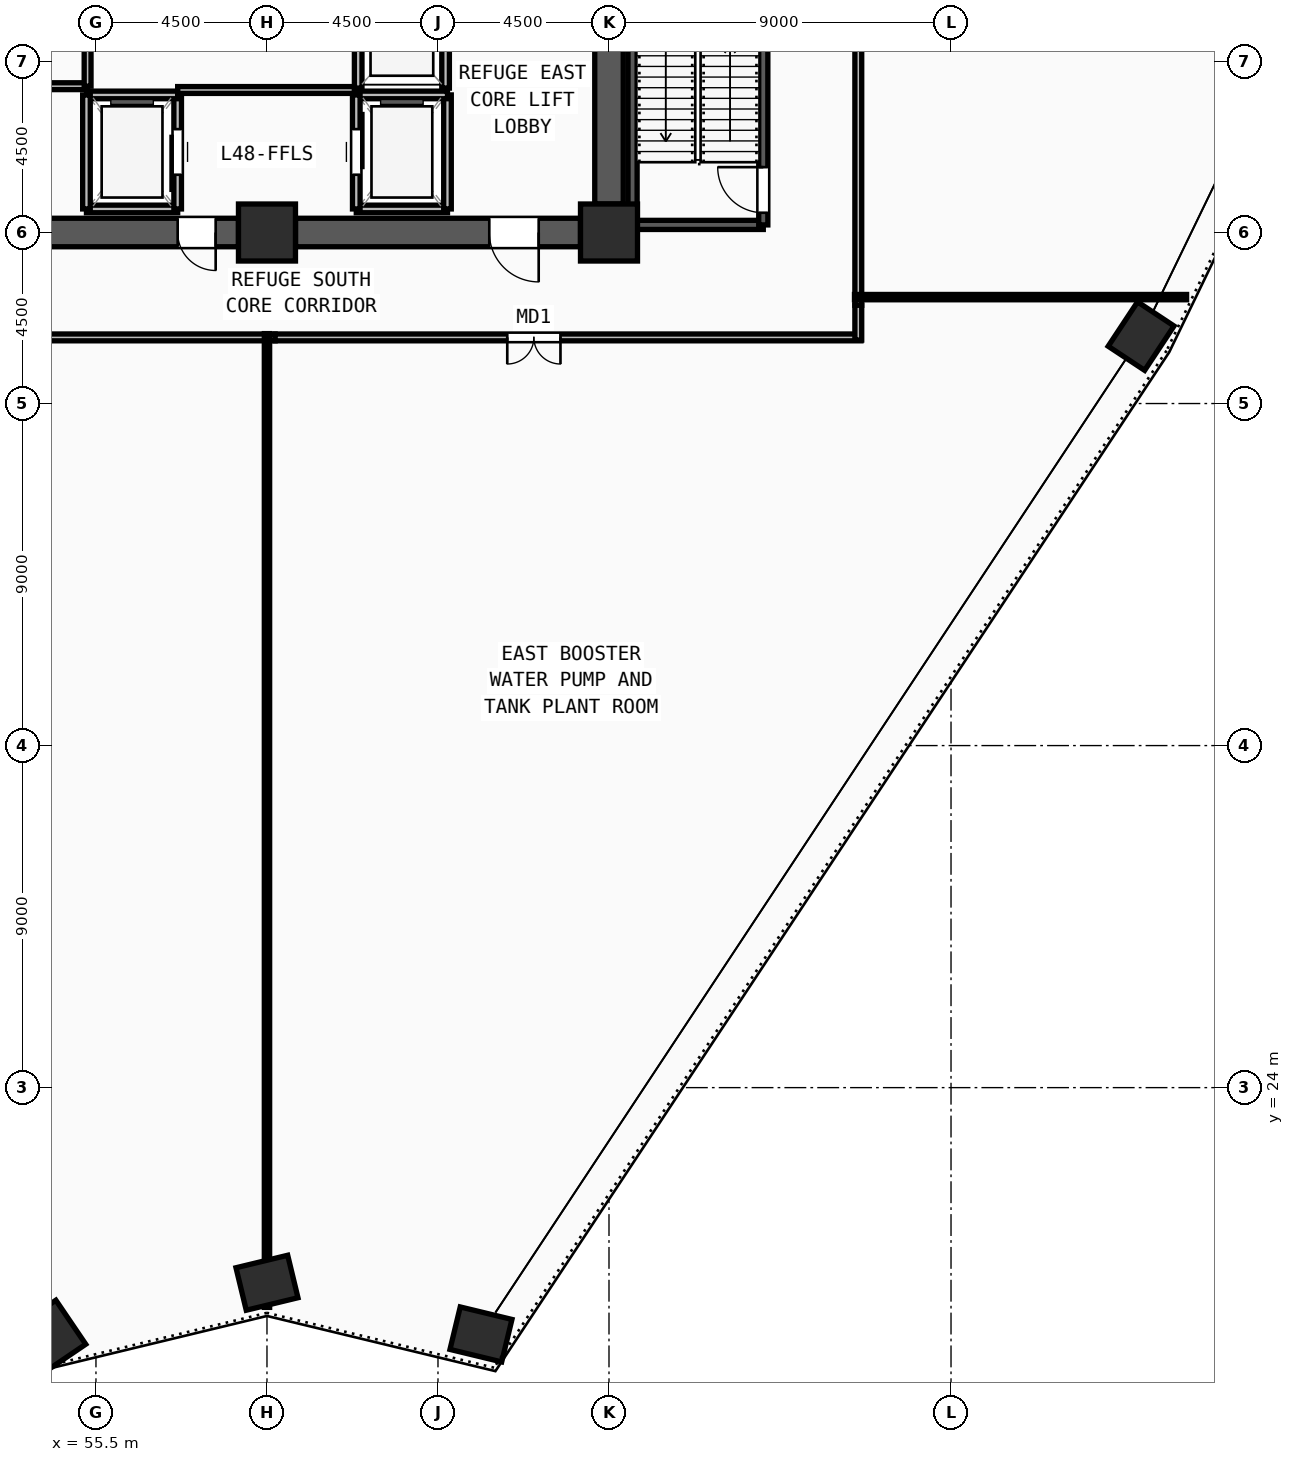
"""IFC4 building model, lengths in metres.
Left out: names, types, materials, properties, quantities, classifications, styles, units other than length and angle.
Written with IfcOpenShell. Run it as: python <this file> out.ifc"""

import sys

from ifc_helpers import new_model, si_unit, direction, frame, frame_2d, origin, origin_2d, place, context, subcontext, project, spatial, rectangle, extrude, source, transform, mapped, element, fill, save


model = new_model("IFC4")
c1 = context("Model", 3, precision=1e-05, world=origin(), true_north=direction((0.0, 1.0)))
c2 = subcontext(c1, "Body", "Model", "MODEL_VIEW")
j1 = project(units=[si_unit("LENGTHUNIT", "METRE"), si_unit("PLANEANGLEUNIT", "RADIAN")], contexts=[c1])
p1 = place(None, origin())
s1 = spatial("IfcSite", under=j1, at=p1, CompositionType="ELEMENT")
p2 = place(p1, origin())
s2 = spatial("IfcBuilding", under=s1, at=p2, CompositionType="ELEMENT")
p3 = place(p2, frame((0.0, 0.0, 185.25)))
s3 = spatial("IfcBuildingStorey", under=s2, at=p3, CompositionType="ELEMENT", Elevation=185.25)
m1 = source(origin(), c2, "Body", "SweptSolid", [
    extrude(rectangle(XDim=1.5, YDim=1.5, at=origin_2d()), origin(), (0.0, 0.0, 1.0), 4.5),
])
for number, where, z_axis, x_axis in (
    (1, (60.0, 46.5, 0.0), (0.0, 0.0, 1.0), (1.0, 0.0, 0.0)),
    (2, (69.0, 46.5, 0.0), (0.0, 0.0, 1.0), (1.0, 0.0, 0.0)),
):
    element("IfcColumn", number, at=place(p3, frame(where, z_axis=z_axis, x_axis=x_axis)), inside=s3, PredefinedType="COLUMN", context=c2, shape_type="MappedRepresentation", body=[
        mapped(m1, transform((0.0, 0.0, 0.0), x_axis=(1.0, 0.0, 0.0), y_axis=(0.0, 1.0, 0.0), z_axis=(0.0, 0.0, 1.0), scale=1.0)),
    ])
m2 = source(origin(), c2, "Body", "SweptSolid", [
    extrude(rectangle(XDim=1.4, YDim=1.15, at=origin_2d()), origin(), (0.0, 0.0, 1.0), 4.5),
])
for number, where, z_axis, x_axis in (
    (3, (54.362, 17.504, 0.0), (0.0, 0.0, 1.0), (-0.562, 0.827, 0.0)),
    (4, (83.002, 43.774, 0.0), (0.0, 0.0, 1.0), (0.552, 0.834, 0.0)),
    (5, (65.631, 17.506, 0.0), (0.0, 0.0, 1.0), (-0.972, 0.235, 0.0)),
    (6, (60.0, 18.866, 0.0), (0.0, 0.0, 1.0), (0.972, 0.235, 0.0)),
):
    element("IfcColumn", number, at=place(p3, frame(where, z_axis=z_axis, x_axis=x_axis)), inside=s3, PredefinedType="COLUMN", context=c2, shape_type="MappedRepresentation", body=[
        mapped(m2, transform((0.0, 0.0, 0.0), x_axis=(1.0, 0.0, 0.0), y_axis=(0.0, 1.0, 0.0), z_axis=(0.0, 0.0, 1.0), scale=1.0)),
    ])
p4 = place(p3, frame((69.0, 60.75, 0.0), z_axis=(0.0, 0.0, 1.0), x_axis=(0.0, -1.0, 0.0)))
e7 = element("IfcWall", 7, at=p4, inside=s3, PredefinedType="SHEAR", context=c2, shape_type="SweptSolid", body=[
    extrude(rectangle(XDim=13.5, YDim=0.75, at=frame_2d((6.75, 0.0))), origin(), (0.0, 0.0, 1.0), 4.22),
])
m3 = source(origin(), c2, "Body", "SweptSolid", [
    extrude(rectangle(XDim=1.2, YDim=2.2, at=frame_2d((0.6, 1.1))), frame((0.0, 0.385, 0.0), z_axis=(0.0, -1.0, 0.0), x_axis=(1.0, 0.0, 0.0)), (0.0, 0.0, 1.0), 0.77),
])
p5 = place(p4, frame((1.2, 0.0, 0.0)))
e8 = element("IfcOpeningElement", 8, at=p5, cuts=e7, PredefinedType="OPENING", context=c2, shape_type="MappedRepresentation", body=[
    mapped(m3, transform((0.0, 0.0, 0.0), x_axis=(1.0, 0.0, 0.0), y_axis=(0.0, 1.0, 0.0), z_axis=(0.0, 0.0, 1.0), scale=1.0)),
])
p6 = place(p3, frame((68.25, 46.5, 0.0), z_axis=(0.0, 0.0, 1.0), x_axis=(-1.0, 0.0, 0.0)))
e9 = element("IfcWall", 9, at=p6, inside=s3, PredefinedType="SHEAR", context=c2, shape_type="SweptSolid", body=[
    extrude(rectangle(XDim=7.5, YDim=0.75, at=frame_2d((3.75, 0.0))), origin(), (0.0, 0.0, 1.0), 4.22),
])
m4 = source(origin(), c2, "Body", "SweptSolid", [
    extrude(rectangle(XDim=1.3, YDim=2.2, at=frame_2d((0.65, 1.1))), frame((0.0, 0.385, 0.0), z_axis=(0.0, -1.0, 0.0), x_axis=(1.0, 0.0, 0.0)), (0.0, 0.0, 1.0), 0.77),
])
p7 = place(p6, frame((1.1, 0.0, 0.0)))
e10 = element("IfcOpeningElement", 10, at=p7, cuts=e9, PredefinedType="OPENING", context=c2, shape_type="MappedRepresentation", body=[
    mapped(m4, transform((0.0, 0.0, 0.0), x_axis=(1.0, 0.0, 0.0), y_axis=(0.0, 1.0, 0.0), z_axis=(0.0, 0.0, 1.0), scale=1.0)),
])
p8 = place(p3, frame((59.25, 46.5, 0.0), z_axis=(0.0, 0.0, 1.0), x_axis=(-1.0, 0.0, 0.0)))
e11 = element("IfcWall", 11, at=p8, inside=s3, PredefinedType="SHEAR", context=c2, shape_type="SweptSolid", body=[
    extrude(rectangle(XDim=7.5, YDim=0.75, at=frame_2d((3.75, 0.0))), origin(), (0.0, 0.0, 1.0), 4.22),
])
p9 = place(p8, frame((5.1, 0.0, 0.0)))
e12 = element("IfcOpeningElement", 12, at=p9, cuts=e11, PredefinedType="OPENING", context=c2, shape_type="MappedRepresentation", body=[
    mapped(m4, transform((0.0, 0.0, 0.0), x_axis=(1.0, 0.0, 0.0), y_axis=(0.0, 1.0, 0.0), z_axis=(0.0, 0.0, 1.0), scale=1.0)),
])
m5 = source(origin(), c2, "Body", "SweptSolid", [
    extrude(rectangle(XDim=1.0, YDim=2.2, at=frame_2d((0.5, 1.1))), frame((0.0, 0.385, 0.0), z_axis=(0.0, -1.0, 0.0), x_axis=(1.0, 0.0, 0.0)), (0.0, 0.0, 1.0), 0.77),
])
p10 = place(p8, frame((0.6, 0.0, 0.0)))
e13 = element("IfcOpeningElement", 13, at=p10, cuts=e11, PredefinedType="OPENING", context=c2, shape_type="MappedRepresentation", body=[
    mapped(m5, transform((0.0, 0.0, 0.0), x_axis=(1.0, 0.0, 0.0), y_axis=(0.0, 1.0, 0.0), z_axis=(0.0, 0.0, 1.0), scale=1.0)),
])
p11 = place(p3, frame((69.62, 46.7, 0.0), z_axis=(0.0, 0.0, 1.0), x_axis=(1.0, 0.0, 0.0)))
e14 = element("IfcWall", 14, at=p11, inside=s3, PredefinedType="SOLIDWALL", context=c2, shape_type="SweptSolid", body=[
    extrude(rectangle(XDim=3.44, YDim=0.24, at=frame_2d((1.72, 0.0))), origin(), (0.0, 0.0, 1.0), 4.22),
])
p12 = place(p3, frame((73.06, 46.7, 0.0), z_axis=(0.0, 0.0, 1.0), x_axis=(0.0, 1.0, 0.0)))
e15 = element("IfcWall", 15, at=p12, inside=s3, PredefinedType="SOLIDWALL", context=c2, shape_type="SweptSolid", body=[
    extrude(rectangle(XDim=7.82, YDim=0.24, at=frame_2d((3.91, 0.0))), origin(), (0.0, 0.0, 1.0), 4.22),
])
m6 = source(origin(), c2, "Body", "SweptSolid", [
    extrude(rectangle(XDim=1.2, YDim=2.2, at=frame_2d((0.6, 1.1))), frame((0.0, 0.13, 0.0), z_axis=(0.0, -1.0, 0.0), x_axis=(1.0, 0.0, 0.0)), (0.0, 0.0, 1.0), 0.26),
])
p13 = place(p12, frame((0.32, 0.0, 0.0)))
e16 = element("IfcOpeningElement", 16, at=p13, cuts=e15, PredefinedType="OPENING", context=c2, shape_type="MappedRepresentation", body=[
    mapped(m6, transform((0.0, 0.0, 0.0), x_axis=(1.0, 0.0, 0.0), y_axis=(0.0, 1.0, 0.0), z_axis=(0.0, 0.0, 1.0), scale=1.0)),
])
p14 = place(p3, frame((69.62, 54.52, 0.0), z_axis=(0.0, 0.0, 1.0), x_axis=(0.0, -1.0, 0.0)))
e17 = element("IfcWall", 17, at=p14, inside=s3, PredefinedType="SOLIDWALL", context=c2, shape_type="SweptSolid", body=[
    extrude(rectangle(XDim=7.82, YDim=0.24, at=frame_2d((3.91, 0.0))), origin(), (0.0, 0.0, 1.0), 4.22),
])
p15 = place(p3, frame((55.25, 47.12, 0.0), z_axis=(0.0, 0.0, 1.0), x_axis=(1.0, 0.0, 0.0)))
e18 = element("IfcWall", 18, at=p15, inside=s3, PredefinedType="SOLIDWALL", context=c2, shape_type="SweptSolid", body=[
    extrude(rectangle(XDim=2.4, YDim=0.2, at=frame_2d((1.2, 0.0))), origin(), (0.0, 0.0, 1.0), 4.22),
])
p16 = place(p3, frame((57.65, 47.12, 0.0), z_axis=(0.0, 0.0, 1.0), x_axis=(0.0, 1.0, 0.0)))
e19 = element("IfcWall", 19, at=p16, inside=s3, PredefinedType="SOLIDWALL", context=c2, shape_type="SweptSolid", body=[
    extrude(rectangle(XDim=3.0, YDim=0.2, at=frame_2d((1.5, 0.0))), origin(), (0.0, 0.0, 1.0), 4.22),
])
m7 = source(origin(), c2, "Body", "SweptSolid", [
    extrude(rectangle(XDim=1.2, YDim=2.3, at=frame_2d((0.6, 1.15))), frame((0.0, 0.11, 0.0), z_axis=(0.0, -1.0, 0.0), x_axis=(1.0, 0.0, 0.0)), (0.0, 0.0, 1.0), 0.22),
])
p17 = place(p16, frame((0.9, 0.0, 0.0)))
e20 = element("IfcOpeningElement", 20, at=p17, cuts=e19, PredefinedType="OPENING", context=c2, shape_type="MappedRepresentation", body=[
    mapped(m7, transform((0.0, 0.0, 0.0), x_axis=(1.0, 0.0, 0.0), y_axis=(0.0, 1.0, 0.0), z_axis=(0.0, 0.0, 1.0), scale=1.0)),
])
p18 = place(p3, frame((57.65, 50.12, 0.0), z_axis=(0.0, 0.0, 1.0), x_axis=(-1.0, 0.0, 0.0)))
e21 = element("IfcWall", 21, at=p18, inside=s3, PredefinedType="SOLIDWALL", context=c2, shape_type="SweptSolid", body=[
    extrude(rectangle(XDim=2.4, YDim=0.2, at=frame_2d((1.2, 0.0))), origin(), (0.0, 0.0, 1.0), 4.22),
])
p19 = place(p3, frame((55.25, 50.12, 0.0), z_axis=(0.0, 0.0, 1.0), x_axis=(0.0, -1.0, 0.0)))
e22 = element("IfcWall", 22, at=p19, inside=s3, PredefinedType="SOLIDWALL", context=c2, shape_type="SweptSolid", body=[
    extrude(rectangle(XDim=3.0, YDim=0.2, at=frame_2d((1.5, 0.0))), origin(), (0.0, 0.0, 1.0), 4.22),
])
p20 = place(p3, frame((62.35, 47.12, 0.0), z_axis=(0.0, 0.0, 1.0), x_axis=(1.0, 0.0, 0.0)))
e23 = element("IfcWall", 23, at=p20, inside=s3, PredefinedType="SOLIDWALL", context=c2, shape_type="SweptSolid", body=[
    extrude(rectangle(XDim=2.4, YDim=0.2, at=frame_2d((1.2, 0.0))), origin(), (0.0, 0.0, 1.0), 4.22),
])
p21 = place(p3, frame((64.75, 47.12, 0.0), z_axis=(0.0, 0.0, 1.0), x_axis=(0.0, 1.0, 0.0)))
e24 = element("IfcWall", 24, at=p21, inside=s3, PredefinedType="SOLIDWALL", context=c2, shape_type="SweptSolid", body=[
    extrude(rectangle(XDim=3.0, YDim=0.2, at=frame_2d((1.5, 0.0))), origin(), (0.0, 0.0, 1.0), 4.22),
])
p22 = place(p3, frame((64.75, 50.12, 0.0), z_axis=(0.0, 0.0, 1.0), x_axis=(-1.0, 0.0, 0.0)))
e25 = element("IfcWall", 25, at=p22, inside=s3, PredefinedType="SOLIDWALL", context=c2, shape_type="SweptSolid", body=[
    extrude(rectangle(XDim=2.4, YDim=0.2, at=frame_2d((1.2, 0.0))), origin(), (0.0, 0.0, 1.0), 4.22),
])
p23 = place(p3, frame((62.35, 50.12, 0.0), z_axis=(0.0, 0.0, 1.0), x_axis=(0.0, -1.0, 0.0)))
e26 = element("IfcWall", 26, at=p23, inside=s3, PredefinedType="SOLIDWALL", context=c2, shape_type="SweptSolid", body=[
    extrude(rectangle(XDim=3.0, YDim=0.2, at=frame_2d((1.5, 0.0))), origin(), (0.0, 0.0, 1.0), 4.22),
])
p24 = place(p23, frame((0.9, 0.0, 0.0)))
e27 = element("IfcOpeningElement", 27, at=p24, cuts=e26, PredefinedType="OPENING", context=c2, shape_type="MappedRepresentation", body=[
    mapped(m7, transform((0.0, 0.0, 0.0), x_axis=(1.0, 0.0, 0.0), y_axis=(0.0, 1.0, 0.0), z_axis=(0.0, 0.0, 1.0), scale=1.0)),
])
for number, where, z_axis, x_axis in (
    (28, (64.7, 50.3, 0.0), (0.0, 0.0, 1.0), (0.0, 1.0, 0.0)),
    (29, (62.4, 52.9, 0.0), (0.0, 0.0, 1.0), (0.0, -1.0, 0.0)),
):
    element("IfcWall", number, at=place(p3, frame(where, z_axis=z_axis, x_axis=x_axis)), inside=s3, PredefinedType="SOLIDWALL", context=c2, shape_type="SweptSolid", body=[
        extrude(rectangle(XDim=2.6, YDim=0.2, at=frame_2d((1.3, 0.0))), origin(), (0.0, 0.0, 1.0), 4.22),
    ])
p25 = place(p3, frame((75.56, 67.015, 0.0), z_axis=(0.0, 0.0, 1.0), x_axis=(0.0, -1.0, 0.0)))
e30 = element("IfcWall", 30, at=p25, inside=s3, PredefinedType="PARTITIONING", context=c2, shape_type="SweptSolid", body=[
    extrude(rectangle(XDim=22.43, YDim=0.18, at=frame_2d((11.215, 0.0))), origin(), (0.0, 0.0, 1.0), 3.805),
])
m8 = source(origin(), c2, "Body", "SweptSolid", [
    extrude(rectangle(XDim=1.3, YDim=2.2, at=frame_2d((0.65, 1.1))), frame((0.0, 0.1, 0.0), z_axis=(0.0, -1.0, 0.0), x_axis=(1.0, 0.0, 0.0)), (0.0, 0.0, 1.0), 0.2),
])
p26 = place(p25, frame((10.565, 0.0, 0.0)))
e31 = element("IfcOpeningElement", 31, at=p26, cuts=e30, PredefinedType="OPENING", context=c2, shape_type="MappedRepresentation", body=[
    mapped(m8, transform((0.0, 0.0, 0.0), x_axis=(1.0, 0.0, 0.0), y_axis=(0.0, 1.0, 0.0), z_axis=(0.0, 0.0, 1.0), scale=1.0)),
])
p27 = place(p3, frame((60.215, 43.74, 0.0), z_axis=(0.0, 0.0, 1.0), x_axis=(-1.0, 0.0, 0.0)))
e32 = element("IfcWall", 32, at=p27, inside=s3, PredefinedType="PARTITIONING", context=c2, shape_type="SweptSolid", body=[
    extrude(rectangle(XDim=15.845, YDim=0.18, at=frame_2d((7.922, 0.0))), origin(), (0.0, 0.0, 1.0), 4.22),
])
p28 = place(p27, frame((6.673, 0.0, 0.0)))
e33 = element("IfcOpeningElement", 33, at=p28, cuts=e32, PredefinedType="OPENING", context=c2, shape_type="MappedRepresentation", body=[
    mapped(m8, transform((0.0, 0.0, 0.0), x_axis=(1.0, 0.0, 0.0), y_axis=(0.0, 1.0, 0.0), z_axis=(0.0, 0.0, 1.0), scale=1.0)),
])
p29 = place(p3, frame((75.63, 43.74, 0.0), z_axis=(0.0, 0.0, 1.0), x_axis=(-1.0, 0.0, 0.0)))
e34 = element("IfcWall", 34, at=p29, inside=s3, PredefinedType="PARTITIONING", context=c2, shape_type="SweptSolid", body=[
    extrude(rectangle(XDim=15.415, YDim=0.18, at=frame_2d((7.708, 0.0))), origin(), (0.0, 0.0, 1.0), 4.22),
])
m9 = source(origin(), c2, "Body", "SweptSolid", [
    extrude(rectangle(XDim=1.4, YDim=2.25, at=frame_2d((0.7, 1.125))), frame((0.0, 0.1, 0.0), z_axis=(0.0, -1.0, 0.0), x_axis=(1.0, 0.0, 0.0)), (0.0, 0.0, 1.0), 0.2),
])
p30 = place(p29, frame((7.907, 0.0, 0.0)))
e35 = element("IfcOpeningElement", 35, at=p30, cuts=e34, PredefinedType="OPENING", context=c2, shape_type="MappedRepresentation", body=[
    mapped(m9, transform((0.0, 0.0, 0.0), x_axis=(1.0, 0.0, 0.0), y_axis=(0.0, 1.0, 0.0), z_axis=(0.0, 0.0, 1.0), scale=1.0)),
])
p31 = place(p3, frame((53.79, 50.35, 0.0), z_axis=(0.0, 0.0, 1.0), x_axis=(1.0, 0.0, 0.0)))
e36 = element("IfcWall", 36, at=p31, inside=s3, PredefinedType="PARTITIONING", context=c2, shape_type="SweptSolid", body=[
    extrude(rectangle(XDim=1.49, YDim=0.18, at=frame_2d((0.745, 0.0))), origin(), (0.0, 0.0, 1.0), 4.22),
])
p32 = place(p3, frame((55.28, 50.35, 0.0), z_axis=(0.0, 0.0, 1.0), x_axis=(0.0, 1.0, 0.0)))
e37 = element("IfcWall", 37, at=p32, inside=s3, PredefinedType="PARTITIONING", context=c2, shape_type="SweptSolid", body=[
    extrude(rectangle(XDim=2.57, YDim=0.18, at=frame_2d((1.285, 0.0))), origin(), (0.0, 0.0, 1.0), 4.22),
])
p33 = place(p3, frame((75.56, 44.585, 0.0), z_axis=(0.0, 0.0, 1.0), x_axis=(0.0, -1.0, 0.0)))
e38 = element("IfcWall", 38, at=p33, inside=s3, PredefinedType="PARTITIONING", context=c2, shape_type="SweptSolid", body=[
    extrude(rectangle(XDim=0.915, YDim=0.18, at=frame_2d((0.458, 0.0))), origin(), (0.0, 0.0, 1.0), 4.22),
])
p34 = place(p3, frame((75.46, 44.8, 0.0), z_axis=(0.0, 0.0, 1.0), x_axis=(1.0, 0.0, 0.0)))
e39 = element("IfcWall", 39, at=p34, inside=s3, PredefinedType="PARTITIONING", context=c2, shape_type="SweptSolid", body=[
    extrude(rectangle(XDim=8.739, YDim=0.14, at=frame_2d((4.37, 0.0))), origin(), (0.0, 0.0, 1.0), 4.22),
])
p35 = place(p3, frame((60.0, 43.84, 0.0), z_axis=(0.0, 0.0, 1.0), x_axis=(0.0, -1.0, 0.0)))
e40 = element("IfcWall", 40, at=p35, inside=s3, PredefinedType="PARTITIONING", context=c2, shape_type="SweptSolid", body=[
    extrude(rectangle(XDim=25.622, YDim=0.14, at=frame_2d((12.811, 0.0))), origin(), (0.0, 0.0, 1.0), 4.22),
])
p36 = place(p3, frame((57.65, 50.25, 0.0), z_axis=(0.0, 0.0, 1.0), x_axis=(1.0, 0.0, 0.0)))
e41 = element("IfcWall", 41, at=p36, inside=s3, PredefinedType="PARTITIONING", context=c2, shape_type="SweptSolid", body=[
    extrude(rectangle(XDim=4.65, YDim=0.18, at=frame_2d((2.325, 0.0))), origin(), (0.0, 0.0, 1.0), 4.22),
])
m10 = source(origin(), c2, "Body", "SweptSolid", [
    extrude(rectangle(XDim=1.0, YDim=2.2, at=frame_2d((0.5, 1.1))), frame((0.0, 0.025, 0.0), z_axis=(0.0, -1.0, 0.0), x_axis=(1.0, 0.0, 0.0)), (0.0, 0.0, 1.0), 0.05),
])
p37 = place(p10, origin())
e42 = element("IfcDoor", 42, at=p37, inside=s3, OperationType="SINGLE_SWING_LEFT", PredefinedType="DOOR", context=c2, shape_type="MappedRepresentation", body=[
    mapped(m10, transform((0.0, 0.0, 0.0), x_axis=(1.0, 0.0, 0.0), y_axis=(0.0, 1.0, 0.0), z_axis=(0.0, 0.0, 1.0), scale=1.0)),
])
fill(e13, e42)
m11 = source(origin(), c2, "Body", "SweptSolid", [
    extrude(rectangle(XDim=1.3, YDim=2.2, at=frame_2d((0.65, 1.1))), frame((0.0, 0.025, 0.0), z_axis=(0.0, -1.0, 0.0), x_axis=(1.0, 0.0, 0.0)), (0.0, 0.0, 1.0), 0.05),
])
p38 = place(p7, origin())
e43 = element("IfcDoor", 43, at=p38, inside=s3, OperationType="SINGLE_SWING_LEFT", PredefinedType="DOOR", context=c2, shape_type="MappedRepresentation", body=[
    mapped(m11, transform((0.0, 0.0, 0.0), x_axis=(1.0, 0.0, 0.0), y_axis=(0.0, 1.0, 0.0), z_axis=(0.0, 0.0, 1.0), scale=1.0)),
])
fill(e10, e43)
m12 = source(origin(), c2, "Body", "SweptSolid", [
    extrude(rectangle(XDim=1.2, YDim=2.2, at=frame_2d((0.6, 1.1))), frame((0.0, 0.025, 0.0), z_axis=(0.0, -1.0, 0.0), x_axis=(1.0, 0.0, 0.0)), (0.0, 0.0, 1.0), 0.05),
])
p39 = place(p13, origin())
e44 = element("IfcDoor", 44, at=p39, inside=s3, OperationType="SINGLE_SWING_RIGHT", PredefinedType="DOOR", context=c2, shape_type="MappedRepresentation", body=[
    mapped(m12, transform((0.0, 0.0, 0.0), x_axis=(1.0, 0.0, 0.0), y_axis=(0.0, 1.0, 0.0), z_axis=(0.0, 0.0, 1.0), scale=1.0)),
])
fill(e16, e44)
m13 = source(origin(), c2, "Body", "SweptSolid", [
    extrude(rectangle(XDim=1.2, YDim=2.3, at=frame_2d((0.6, 1.15))), frame((0.0, 0.025, 0.0), z_axis=(0.0, -1.0, 0.0), x_axis=(1.0, 0.0, 0.0)), (0.0, 0.0, 1.0), 0.05),
])
p40 = place(p17, origin())
e45 = element("IfcDoor", 45, at=p40, inside=s3, OperationType="SLIDING_TO_LEFT", PredefinedType="DOOR", context=c2, shape_type="MappedRepresentation", body=[
    mapped(m13, transform((0.0, 0.0, 0.0), x_axis=(1.0, 0.0, 0.0), y_axis=(0.0, 1.0, 0.0), z_axis=(0.0, 0.0, 1.0), scale=1.0)),
])
fill(e20, e45)
p41 = place(p24, origin())
e46 = element("IfcDoor", 46, at=p41, inside=s3, OperationType="SLIDING_TO_LEFT", PredefinedType="DOOR", context=c2, shape_type="MappedRepresentation", body=[
    mapped(m13, transform((0.0, 0.0, 0.0), x_axis=(1.0, 0.0, 0.0), y_axis=(0.0, 1.0, 0.0), z_axis=(0.0, 0.0, 1.0), scale=1.0)),
])
fill(e27, e46)
m14 = source(origin(), c2, "Body", "SweptSolid", [
    extrude(rectangle(XDim=1.4, YDim=2.25, at=frame_2d((0.7, 1.125))), frame((0.0, 0.025, 0.0), z_axis=(0.0, -1.0, 0.0), x_axis=(1.0, 0.0, 0.0)), (0.0, 0.0, 1.0), 0.05),
])
p42 = place(p30, origin())
e47 = element("IfcDoor", 47, at=p42, inside=s3, OperationType="DOUBLE_DOOR_SINGLE_SWING", PredefinedType="DOOR", context=c2, shape_type="MappedRepresentation", body=[
    mapped(m14, transform((0.0, 0.0, 0.0), x_axis=(1.0, 0.0, 0.0), y_axis=(0.0, 1.0, 0.0), z_axis=(0.0, 0.0, 1.0), scale=1.0)),
])
fill(e35, e47)
save(model, sys.argv[1])
